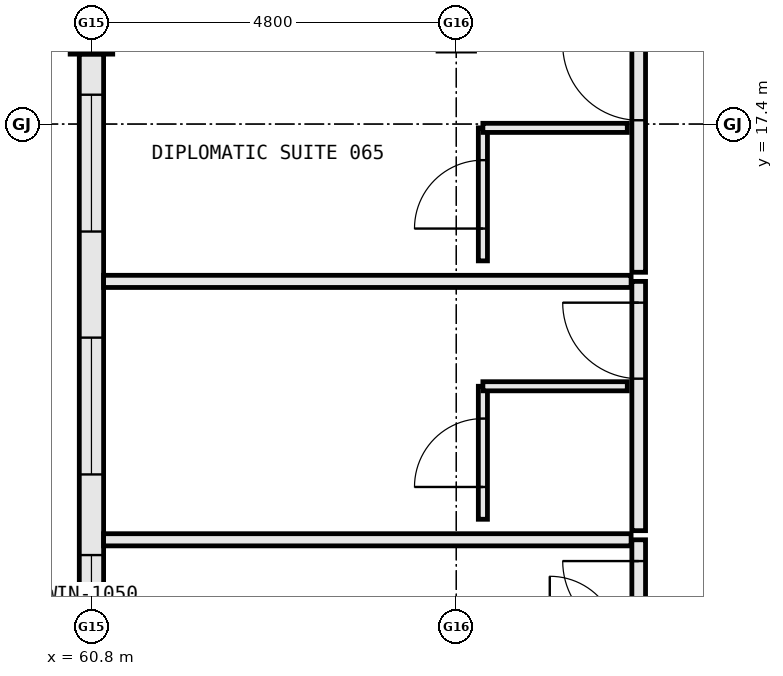
"""IFC4 building model, lengths in metres.
Left out: names, types, materials, properties, quantities, classifications, styles, units other than length and angle.
Written with IfcOpenShell. Run it as: python <this file> out.ifc"""

import sys

from ifc_helpers import new_model, si_unit, direction, frame, frame_2d, origin, origin_2d, place, context, subcontext, project, spatial, rectangle, extrude, element, fill, save


model = new_model("IFC4")
c1 = context("Model", 3, precision=1e-05, world=origin(), true_north=direction((0.0, 1.0)))
c2 = subcontext(c1, "Body", "Model", "MODEL_VIEW")
j1 = project(units=[si_unit("LENGTHUNIT", "METRE"), si_unit("PLANEANGLEUNIT", "RADIAN")], contexts=[c1])
p1 = place(None, origin())
s1 = spatial("IfcSite", under=j1, at=p1, CompositionType="ELEMENT")
p2 = place(p1, origin())
s2 = spatial("IfcBuilding", under=s1, at=p2, CompositionType="ELEMENT")
p3 = place(p2, frame((0.0, 0.0, 16.2)))
s3 = spatial("IfcBuildingStorey", under=s2, at=p3, CompositionType="ELEMENT", Elevation=16.2)
p4 = place(p3, frame((60.8, 18.6, 0.0), z_axis=(0.0, 0.0, 1.0), x_axis=(1.0, 0.0, 0.0)))
e1 = element("IfcColumn", 1, at=p4, inside=s3, PredefinedType="COLUMN", context=c2, shape_type="SweptSolid", body=[
    extrude(rectangle(XDim=0.56, YDim=0.56, at=origin_2d()), origin(), (0.0, 0.0, 1.0), 3.8),
])
p5 = place(p3, frame((60.8, 18.322, 0.0), z_axis=(0.0, 0.0, 1.0), x_axis=(0.0, -1.0, 0.0)))
e2 = element("IfcWall", 2, at=p5, inside=s3, PredefinedType="STANDARD", context=c2, shape_type="SweptSolid", body=[
    extrude(rectangle(XDim=7.844, YDim=0.32, at=frame_2d((3.922, 0.0))), origin(), (0.0, 0.0, 1.0), 3.015),
])
p6 = place(p5, frame((6.593, 0.0, 0.85)))
e3 = element("IfcOpeningElement", 3, at=p6, cuts=e2, PredefinedType="OPENING", context=c2, shape_type="SweptSolid", body=[
    extrude(rectangle(XDim=1.05, YDim=1.45, at=frame_2d((0.525, 0.725))), frame((0.0, 0.172, 0.0), z_axis=(0.0, -1.0, 0.0), x_axis=(1.0, 0.0, 0.0)), (0.0, 0.0, 1.0), 0.344),
])
p7 = place(p5, frame((3.732, 0.0, 0.85)))
e4 = element("IfcOpeningElement", 4, at=p7, cuts=e2, PredefinedType="OPENING", context=c2, shape_type="SweptSolid", body=[
    extrude(rectangle(XDim=1.8, YDim=1.85, at=frame_2d((0.9, 0.925))), frame((0.0, 0.172, 0.0), z_axis=(0.0, -1.0, 0.0), x_axis=(1.0, 0.0, 0.0)), (0.0, 0.0, 1.0), 0.344),
])
p8 = place(p5, frame((0.536, 0.0, 0.85)))
e5 = element("IfcOpeningElement", 5, at=p8, cuts=e2, PredefinedType="OPENING", context=c2, shape_type="SweptSolid", body=[
    extrude(rectangle(XDim=1.8, YDim=1.85, at=frame_2d((0.9, 0.925))), frame((0.0, 0.172, 0.0), z_axis=(0.0, -1.0, 0.0), x_axis=(1.0, 0.0, 0.0)), (0.0, 0.0, 1.0), 0.344),
])
p9 = place(p3, frame((68.0, 8.65, 0.0), z_axis=(0.0, 0.0, 1.0), x_axis=(0.0, 1.0, 0.0)))
e6 = element("IfcWall", 6, at=p9, inside=s3, PredefinedType="PARTITIONING", context=c2, shape_type="SweptSolid", body=[
    extrude(rectangle(XDim=3.28, YDim=0.18, at=frame_2d((1.64, 0.0))), origin(), (0.0, 0.0, 1.0), 3.56),
])
p10 = place(p9, frame((2.0, 0.0, 0.0)))
e7 = element("IfcOpeningElement", 7, at=p10, cuts=e6, PredefinedType="OPENING", context=c2, shape_type="SweptSolid", body=[
    extrude(rectangle(XDim=1.0, YDim=2.2, at=frame_2d((0.5, 1.1))), frame((0.0, 0.102, 0.0), z_axis=(0.0, -1.0, 0.0), x_axis=(1.0, 0.0, 0.0)), (0.0, 0.0, 1.0), 0.204),
])
p11 = place(p3, frame((60.96, 11.93, 0.0), z_axis=(0.0, 0.0, 1.0), x_axis=(1.0, 0.0, 0.0)))
e8 = element("IfcWall", 8, at=p11, inside=s3, PredefinedType="PARTITIONING", context=c2, shape_type="SweptSolid", body=[
    extrude(rectangle(XDim=6.94, YDim=0.16, at=frame_2d((3.47, 0.0))), origin(), (0.0, 0.0, 1.0), 3.56),
])
p12 = place(p3, frame((68.0, 12.05, 0.0), z_axis=(0.0, 0.0, 1.0), x_axis=(0.0, 1.0, 0.0)))
e9 = element("IfcWall", 9, at=p12, inside=s3, PredefinedType="PARTITIONING", context=c2, shape_type="SweptSolid", body=[
    extrude(rectangle(XDim=3.28, YDim=0.18, at=frame_2d((1.64, 0.0))), origin(), (0.0, 0.0, 1.0), 3.56),
])
p13 = place(p12, frame((2.0, 0.0, 0.0)))
e10 = element("IfcOpeningElement", 10, at=p13, cuts=e9, PredefinedType="OPENING", context=c2, shape_type="SweptSolid", body=[
    extrude(rectangle(XDim=1.0, YDim=2.2, at=frame_2d((0.5, 1.1))), frame((0.0, 0.102, 0.0), z_axis=(0.0, -1.0, 0.0), x_axis=(1.0, 0.0, 0.0)), (0.0, 0.0, 1.0), 0.204),
])
p14 = place(p3, frame((60.96, 15.33, 0.0), z_axis=(0.0, 0.0, 1.0), x_axis=(1.0, 0.0, 0.0)))
e11 = element("IfcWall", 11, at=p14, inside=s3, PredefinedType="PARTITIONING", context=c2, shape_type="SweptSolid", body=[
    extrude(rectangle(XDim=6.94, YDim=0.16, at=frame_2d((3.47, 0.0))), origin(), (0.0, 0.0, 1.0), 3.56),
])
p15 = place(p3, frame((65.95, 12.2, 0.0), z_axis=(0.0, 0.0, 1.0), x_axis=(0.0, 1.0, 0.0)))
e12 = element("IfcWall", 12, at=p15, inside=s3, PredefinedType="PARTITIONING", context=c2, shape_type="SweptSolid", body=[
    extrude(rectangle(XDim=1.75, YDim=0.12, at=frame_2d((0.875, 0.0))), origin(), (0.0, 0.0, 1.0), 3.015),
])
p16 = place(p15, frame((0.425, 0.0, 0.0)))
e13 = element("IfcOpeningElement", 13, at=p16, cuts=e12, PredefinedType="OPENING", context=c2, shape_type="SweptSolid", body=[
    extrude(rectangle(XDim=0.9, YDim=2.15, at=frame_2d((0.45, 1.075))), frame((0.0, 0.072, 0.0), z_axis=(0.0, -1.0, 0.0), x_axis=(1.0, 0.0, 0.0)), (0.0, 0.0, 1.0), 0.144),
])
p17 = place(p3, frame((65.95, 13.95, 0.0), z_axis=(0.0, 0.0, 1.0), x_axis=(1.0, 0.0, 0.0)))
e14 = element("IfcWall", 14, at=p17, inside=s3, PredefinedType="PARTITIONING", context=c2, shape_type="SweptSolid", body=[
    extrude(rectangle(XDim=1.9, YDim=0.12, at=frame_2d((0.95, 0.0))), origin(), (0.0, 0.0, 1.0), 3.56),
])
p18 = place(p3, frame((68.0, 15.45, 0.0), z_axis=(0.0, 0.0, 1.0), x_axis=(0.0, 1.0, 0.0)))
e15 = element("IfcWall", 15, at=p18, inside=s3, PredefinedType="PARTITIONING", context=c2, shape_type="SweptSolid", body=[
    extrude(rectangle(XDim=3.28, YDim=0.18, at=frame_2d((1.64, 0.0))), origin(), (0.0, 0.0, 1.0), 3.56),
])
p19 = place(p18, frame((2.0, 0.0, 0.0)))
e16 = element("IfcOpeningElement", 16, at=p19, cuts=e15, PredefinedType="OPENING", context=c2, shape_type="SweptSolid", body=[
    extrude(rectangle(XDim=1.0, YDim=2.2, at=frame_2d((0.5, 1.1))), frame((0.0, 0.102, 0.0), z_axis=(0.0, -1.0, 0.0), x_axis=(1.0, 0.0, 0.0)), (0.0, 0.0, 1.0), 0.204),
])
p20 = place(p3, frame((65.95, 15.6, 0.0), z_axis=(0.0, 0.0, 1.0), x_axis=(0.0, 1.0, 0.0)))
e17 = element("IfcWall", 17, at=p20, inside=s3, PredefinedType="PARTITIONING", context=c2, shape_type="SweptSolid", body=[
    extrude(rectangle(XDim=1.75, YDim=0.12, at=frame_2d((0.875, 0.0))), origin(), (0.0, 0.0, 1.0), 3.015),
])
p21 = place(p20, frame((0.425, 0.0, 0.0)))
e18 = element("IfcOpeningElement", 18, at=p21, cuts=e17, PredefinedType="OPENING", context=c2, shape_type="SweptSolid", body=[
    extrude(rectangle(XDim=0.9, YDim=2.15, at=frame_2d((0.45, 1.075))), frame((0.0, 0.072, 0.0), z_axis=(0.0, -1.0, 0.0), x_axis=(1.0, 0.0, 0.0)), (0.0, 0.0, 1.0), 0.144),
])
p22 = place(p3, frame((65.95, 17.35, 0.0), z_axis=(0.0, 0.0, 1.0), x_axis=(1.0, 0.0, 0.0)))
e19 = element("IfcWall", 19, at=p22, inside=s3, PredefinedType="PARTITIONING", context=c2, shape_type="SweptSolid", body=[
    extrude(rectangle(XDim=1.9, YDim=0.12, at=frame_2d((0.95, 0.0))), origin(), (0.0, 0.0, 1.0), 3.56),
])
p23 = place(p6, origin())
e20 = element("IfcWindow", 20, at=p23, inside=s3, PartitioningType="SINGLE_PANEL", PredefinedType="WINDOW", context=c2, shape_type="SweptSolid", body=[
    extrude(rectangle(XDim=1.05, YDim=1.45, at=frame_2d((0.525, 0.725))), frame((0.0, 0.03, 0.0), z_axis=(0.0, -1.0, 0.0), x_axis=(1.0, 0.0, 0.0)), (0.0, 0.0, 1.0), 0.06),
])
fill(e3, e20)
p24 = place(p7, origin())
e21 = element("IfcWindow", 21, at=p24, inside=s3, PartitioningType="SINGLE_PANEL", PredefinedType="WINDOW", context=c2, shape_type="SweptSolid", body=[
    extrude(rectangle(XDim=1.8, YDim=1.85, at=frame_2d((0.9, 0.925))), frame((0.0, 0.03, 0.0), z_axis=(0.0, -1.0, 0.0), x_axis=(1.0, 0.0, 0.0)), (0.0, 0.0, 1.0), 0.06),
])
fill(e4, e21)
p25 = place(p8, origin())
e22 = element("IfcWindow", 22, at=p25, inside=s3, PartitioningType="SINGLE_PANEL", PredefinedType="WINDOW", context=c2, shape_type="SweptSolid", body=[
    extrude(rectangle(XDim=1.8, YDim=1.85, at=frame_2d((0.9, 0.925))), frame((0.0, 0.03, 0.0), z_axis=(0.0, -1.0, 0.0), x_axis=(1.0, 0.0, 0.0)), (0.0, 0.0, 1.0), 0.06),
])
fill(e5, e22)
p26 = place(p10, origin())
e23 = element("IfcDoor", 23, at=p26, inside=s3, OperationType="SINGLE_SWING_RIGHT", PredefinedType="DOOR", context=c2, shape_type="SweptSolid", body=[
    extrude(rectangle(XDim=1.0, YDim=2.2, at=frame_2d((0.5, 1.1))), frame((0.0, 0.025, 0.0), z_axis=(0.0, -1.0, 0.0), x_axis=(1.0, 0.0, 0.0)), (0.0, 0.0, 1.0), 0.05),
])
fill(e7, e23)
p27 = place(p13, origin())
e24 = element("IfcDoor", 24, at=p27, inside=s3, OperationType="SINGLE_SWING_RIGHT", PredefinedType="DOOR", context=c2, shape_type="SweptSolid", body=[
    extrude(rectangle(XDim=1.0, YDim=2.2, at=frame_2d((0.5, 1.1))), frame((0.0, 0.025, 0.0), z_axis=(0.0, -1.0, 0.0), x_axis=(1.0, 0.0, 0.0)), (0.0, 0.0, 1.0), 0.05),
])
fill(e10, e24)
p28 = place(p16, origin())
e25 = element("IfcDoor", 25, at=p28, inside=s3, OperationType="SINGLE_SWING_LEFT", PredefinedType="DOOR", context=c2, shape_type="SweptSolid", body=[
    extrude(rectangle(XDim=0.9, YDim=2.15, at=frame_2d((0.45, 1.075))), frame((0.0, 0.025, 0.0), z_axis=(0.0, -1.0, 0.0), x_axis=(1.0, 0.0, 0.0)), (0.0, 0.0, 1.0), 0.05),
])
fill(e13, e25)
p29 = place(p19, origin())
e26 = element("IfcDoor", 26, at=p29, inside=s3, OperationType="SINGLE_SWING_RIGHT", PredefinedType="DOOR", context=c2, shape_type="SweptSolid", body=[
    extrude(rectangle(XDim=1.0, YDim=2.2, at=frame_2d((0.5, 1.1))), frame((0.0, 0.025, 0.0), z_axis=(0.0, -1.0, 0.0), x_axis=(1.0, 0.0, 0.0)), (0.0, 0.0, 1.0), 0.05),
])
fill(e16, e26)
p30 = place(p21, origin())
e27 = element("IfcDoor", 27, at=p30, inside=s3, OperationType="SINGLE_SWING_LEFT", PredefinedType="DOOR", context=c2, shape_type="SweptSolid", body=[
    extrude(rectangle(XDim=0.9, YDim=2.15, at=frame_2d((0.45, 1.075))), frame((0.0, 0.025, 0.0), z_axis=(0.0, -1.0, 0.0), x_axis=(1.0, 0.0, 0.0)), (0.0, 0.0, 1.0), 0.05),
])
fill(e18, e27)
save(model, sys.argv[1])
